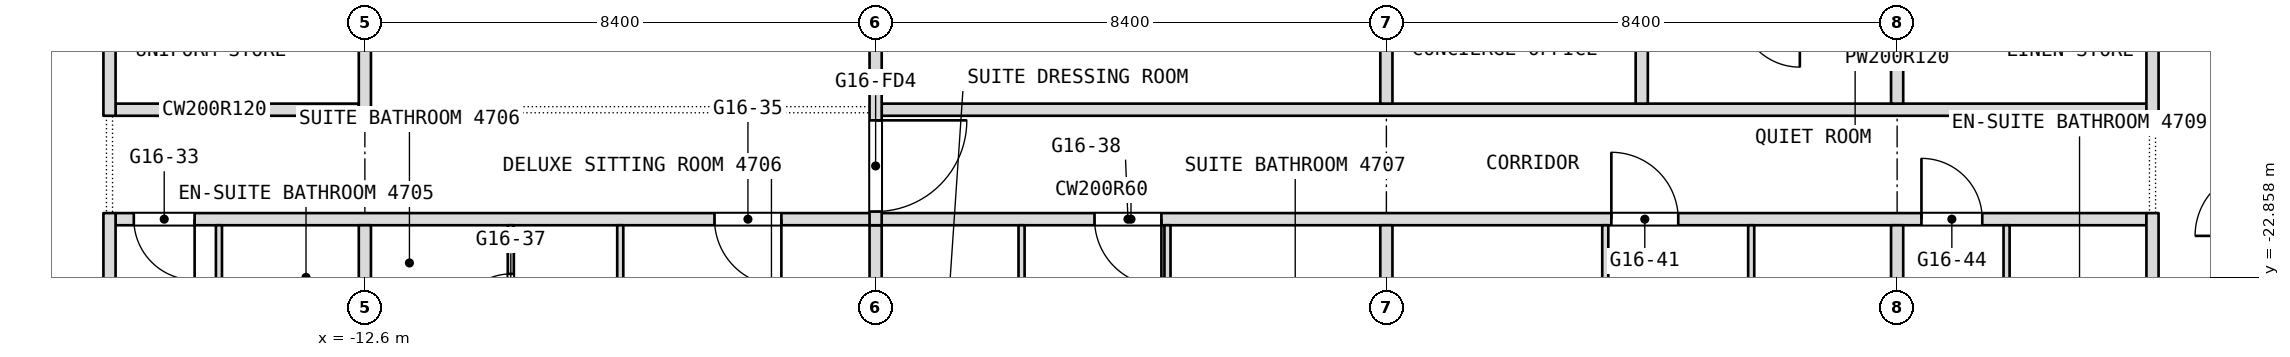
"""IFC4 building model, lengths in metres.
Left out: names, types, materials, properties, quantities, classifications, styles, units other than length and angle.
Written with IfcOpenShell. Run it as: python <this file> out.ifc"""

import sys

from ifc_helpers import new_model, si_unit, direction, frame, frame_2d, origin, place, context, subcontext, project, spatial, rectangle, extrude, element, fill, save


model = new_model("IFC4")
c1 = context("Model", 3, precision=1e-05, world=origin(), true_north=direction((0.0, 1.0)))
c2 = subcontext(c1, "Body", "Model", "MODEL_VIEW")
j1 = project(units=[si_unit("LENGTHUNIT", "METRE"), si_unit("PLANEANGLEUNIT", "RADIAN")], contexts=[c1])
p1 = place(None, origin())
s1 = spatial("IfcSite", under=j1, at=p1, CompositionType="ELEMENT")
p2 = place(p1, origin())
s2 = spatial("IfcBuilding", under=s1, at=p2, CompositionType="ELEMENT")
p3 = place(p2, frame((0.0, 0.0, 205.7)))
s3 = spatial("IfcBuildingStorey", under=s2, at=p3, CompositionType="ELEMENT", Elevation=205.7)
p4 = place(p3, frame((-16.7, -21.9, 0.0), z_axis=(0.0, 0.0, 1.0), x_axis=(1.0, 0.0, 0.0)))
e1 = element("IfcWall", 1, at=p4, inside=s3, PredefinedType="PARTITIONING", context=c2, shape_type="SweptSolid", body=[
    extrude(rectangle(XDim=33.4, YDim=0.2, at=frame_2d((16.7, 0.0))), origin(), (0.0, 0.0, 1.0), 3.34),
])
p5 = place(p4, frame((0.3, 0.0, 0.0)))
e2 = element("IfcOpeningElement", 2, at=p5, cuts=e1, PredefinedType="OPENING", context=c2, shape_type="SweptSolid", body=[
    extrude(rectangle(XDim=1.0, YDim=2.1, at=frame_2d((0.5, 1.05))), frame((0.0, 0.1, 0.0), z_axis=(0.0, -1.0, 0.0), x_axis=(1.0, 0.0, 0.0)), (0.0, 0.0, 1.0), 0.2),
])
p6 = place(p4, frame((9.85, 0.0, 0.0)))
e3 = element("IfcOpeningElement", 3, at=p6, cuts=e1, PredefinedType="OPENING", context=c2, shape_type="SweptSolid", body=[
    extrude(rectangle(XDim=1.1, YDim=2.1, at=frame_2d((0.55, 1.05))), frame((0.0, 0.1, 0.0), z_axis=(0.0, -1.0, 0.0), x_axis=(1.0, 0.0, 0.0)), (0.0, 0.0, 1.0), 0.2),
])
p7 = place(p4, frame((16.1, 0.0, 0.0)))
e4 = element("IfcOpeningElement", 4, at=p7, cuts=e1, PredefinedType="OPENING", context=c2, shape_type="SweptSolid", body=[
    extrude(rectangle(XDim=1.1, YDim=2.1, at=frame_2d((0.55, 1.05))), frame((0.0, 0.1, 0.0), z_axis=(0.0, -1.0, 0.0), x_axis=(1.0, 0.0, 0.0)), (0.0, 0.0, 1.0), 0.2),
])
p8 = place(p4, frame((24.6, 0.0, 0.0)))
e5 = element("IfcOpeningElement", 5, at=p8, cuts=e1, PredefinedType="OPENING", context=c2, shape_type="SweptSolid", body=[
    extrude(rectangle(XDim=1.1, YDim=2.1, at=frame_2d((0.55, 1.05))), frame((0.0, 0.1, 0.0), z_axis=(0.0, -1.0, 0.0), x_axis=(1.0, 0.0, 0.0)), (0.0, 0.0, 1.0), 0.2),
])
p9 = place(p4, frame((29.7, 0.0, 0.0)))
e6 = element("IfcOpeningElement", 6, at=p9, cuts=e1, PredefinedType="OPENING", context=c2, shape_type="SweptSolid", body=[
    extrude(rectangle(XDim=1.0, YDim=2.1, at=frame_2d((0.5, 1.05))), frame((0.0, 0.1, 0.0), z_axis=(0.0, -1.0, 0.0), x_axis=(1.0, 0.0, 0.0)), (0.0, 0.0, 1.0), 0.2),
])
p10 = place(p3, frame((-16.7, -20.1, 0.0), z_axis=(0.0, 0.0, 1.0), x_axis=(1.0, 0.0, 0.0)))
e7 = element("IfcWall", 7, at=p10, inside=s3, PredefinedType="PARTITIONING", context=c2, shape_type="SweptSolid", body=[
    extrude(rectangle(XDim=4.0, YDim=0.2, at=frame_2d((2.0, 0.0))), origin(), (0.0, 0.0, 1.0), 3.34),
])
p11 = place(p3, frame((-4.1, -20.1, 0.0), z_axis=(0.0, 0.0, 1.0), x_axis=(1.0, 0.0, 0.0)))
e8 = element("IfcWall", 8, at=p11, inside=s3, PredefinedType="PARTITIONING", context=c2, shape_type="SweptSolid", body=[
    extrude(rectangle(XDim=20.8, YDim=0.2, at=frame_2d((10.4, 0.0))), origin(), (0.0, 0.0, 1.0), 3.34),
])
p12 = place(p3, frame((16.8, -27.229, 0.0), z_axis=(0.0, 0.0, 1.0), x_axis=(0.0, 1.0, 0.0)))
e9 = element("IfcWall", 9, at=p12, inside=s3, PredefinedType="PARTITIONING", context=c2, shape_type="SweptSolid", body=[
    extrude(rectangle(XDim=5.429, YDim=0.2, at=frame_2d((2.714, 0.0))), origin(), (0.0, 0.0, 1.0), 3.34),
])
p13 = place(p3, frame((16.8, -20.2, 0.0), z_axis=(0.0, 0.0, 1.0), x_axis=(0.0, 1.0, 0.0)))
e10 = element("IfcWall", 10, at=p13, inside=s3, PredefinedType="PARTITIONING", context=c2, shape_type="SweptSolid", body=[
    extrude(rectangle(XDim=6.8, YDim=0.2, at=frame_2d((3.4, 0.0))), origin(), (0.0, 0.0, 1.0), 3.34),
])
p14 = place(p3, frame((14.4, -25.85, 0.0), z_axis=(0.0, 0.0, 1.0), x_axis=(0.0, 1.0, 0.0)))
e11 = element("IfcWall", 11, at=p14, inside=s3, PredefinedType="PARTITIONING", context=c2, shape_type="SweptSolid", body=[
    extrude(rectangle(XDim=3.85, YDim=0.1, at=frame_2d((1.925, 0.0))), origin(), (0.0, 0.0, 1.0), 3.34),
])
p15 = place(p3, frame((12.6, -28.343, 0.0), z_axis=(0.0, 0.0, 1.0), x_axis=(0.0, 1.0, 0.0)))
e12 = element("IfcWall", 12, at=p15, inside=s3, PredefinedType="PARTITIONING", context=c2, shape_type="SweptSolid", body=[
    extrude(rectangle(XDim=6.343, YDim=0.2, at=frame_2d((3.171, 0.0))), origin(), (0.0, 0.0, 1.0), 3.34),
])
p16 = place(p3, frame((12.6, -20.0, 0.0), z_axis=(0.0, 0.0, 1.0), x_axis=(0.0, 1.0, 0.0)))
e13 = element("IfcWall", 13, at=p16, inside=s3, PredefinedType="PARTITIONING", context=c2, shape_type="SweptSolid", body=[
    extrude(rectangle(XDim=1.5, YDim=0.2, at=frame_2d((0.75, 0.0))), origin(), (0.0, 0.0, 1.0), 3.34),
])
p17 = place(p3, frame((10.2, -25.55, 0.0), z_axis=(0.0, 0.0, 1.0), x_axis=(0.0, 1.0, 0.0)))
e14 = element("IfcWall", 14, at=p17, inside=s3, PredefinedType="PARTITIONING", context=c2, shape_type="SweptSolid", body=[
    extrude(rectangle(XDim=3.55, YDim=0.1, at=frame_2d((1.775, 0.0))), origin(), (0.0, 0.0, 1.0), 3.34),
])
p18 = place(p3, frame((8.4, -20.0, 0.0), z_axis=(0.0, 0.0, 1.0), x_axis=(0.0, 1.0, 0.0)))
e15 = element("IfcWall", 15, at=p18, inside=s3, PredefinedType="PARTITIONING", context=c2, shape_type="SweptSolid", body=[
    extrude(rectangle(XDim=1.5, YDim=0.2, at=frame_2d((0.75, 0.0))), origin(), (0.0, 0.0, 1.0), 3.34),
])
p19 = place(p3, frame((7.8, -25.45, 0.0), z_axis=(0.0, 0.0, 1.0), x_axis=(0.0, 1.0, 0.0)))
e16 = element("IfcWall", 16, at=p19, inside=s3, PredefinedType="PARTITIONING", context=c2, shape_type="SweptSolid", body=[
    extrude(rectangle(XDim=3.45, YDim=0.1, at=frame_2d((1.725, 0.0))), origin(), (0.0, 0.0, 1.0), 3.34),
])
p20 = place(p3, frame((4.2, -28.9, 0.0), z_axis=(0.0, 0.0, 1.0), x_axis=(0.0, 1.0, 0.0)))
e17 = element("IfcWall", 17, at=p20, inside=s3, PredefinedType="PARTITIONING", context=c2, shape_type="SweptSolid", body=[
    extrude(rectangle(XDim=6.9, YDim=0.2, at=frame_2d((3.45, 0.0))), origin(), (0.0, 0.0, 1.0), 3.34),
])
p21 = place(p3, frame((4.2, -20.0, 0.0), z_axis=(0.0, 0.0, 1.0), x_axis=(0.0, 1.0, 0.0)))
e18 = element("IfcWall", 18, at=p21, inside=s3, PredefinedType="PARTITIONING", context=c2, shape_type="SweptSolid", body=[
    extrude(rectangle(XDim=6.4, YDim=0.2, at=frame_2d((3.2, 0.0))), origin(), (0.0, 0.0, 1.0), 3.34),
])
p22 = place(p3, frame((0.6, -25.55, 0.0), z_axis=(0.0, 0.0, 1.0), x_axis=(0.0, 1.0, 0.0)))
e19 = element("IfcWall", 19, at=p22, inside=s3, PredefinedType="PARTITIONING", context=c2, shape_type="SweptSolid", body=[
    extrude(rectangle(XDim=3.55, YDim=0.1, at=frame_2d((1.775, 0.0))), origin(), (0.0, 0.0, 1.0), 3.34),
])
p23 = place(p3, frame((-1.8, -25.45, 0.0), z_axis=(0.0, 0.0, 1.0), x_axis=(0.0, 1.0, 0.0)))
e20 = element("IfcWall", 20, at=p23, inside=s3, PredefinedType="PARTITIONING", context=c2, shape_type="SweptSolid", body=[
    extrude(rectangle(XDim=3.45, YDim=0.1, at=frame_2d((1.725, 0.0))), origin(), (0.0, 0.0, 1.0), 3.34),
])
p24 = place(p3, frame((-4.2, -28.9, 0.0), z_axis=(0.0, 0.0, 1.0), x_axis=(0.0, 1.0, 0.0)))
e21 = element("IfcWall", 21, at=p24, inside=s3, PredefinedType="PARTITIONING", context=c2, shape_type="SweptSolid", body=[
    extrude(rectangle(XDim=6.9, YDim=0.2, at=frame_2d((3.45, 0.0))), origin(), (0.0, 0.0, 1.0), 3.34),
])
p25 = place(p3, frame((-4.2, -22.0, 0.0), z_axis=(0.0, 0.0, 1.0), x_axis=(0.0, 1.0, 0.0)))
e22 = element("IfcWall", 22, at=p25, inside=s3, PredefinedType="PARTITIONING", context=c2, shape_type="SweptSolid", body=[
    extrude(rectangle(XDim=8.4, YDim=0.2, at=frame_2d((4.2, 0.0))), origin(), (0.0, 0.0, 1.0), 3.34),
])
p26 = place(p25, frame((0.225, 0.0, 0.0)))
e23 = element("IfcOpeningElement", 23, at=p26, cuts=e22, PredefinedType="OPENING", context=c2, shape_type="SweptSolid", body=[
    extrude(rectangle(XDim=1.5, YDim=2.1, at=frame_2d((0.75, 1.05))), frame((0.0, 0.1, 0.0), z_axis=(0.0, -1.0, 0.0), x_axis=(1.0, 0.0, 0.0)), (0.0, 0.0, 1.0), 0.2),
])
p27 = place(p3, frame((-8.4, -28.9, 0.0), z_axis=(0.0, 0.0, 1.0), x_axis=(0.0, 1.0, 0.0)))
e24 = element("IfcWall", 24, at=p27, inside=s3, PredefinedType="PARTITIONING", context=c2, shape_type="SweptSolid", body=[
    extrude(rectangle(XDim=6.9, YDim=0.1, at=frame_2d((3.45, 0.0))), origin(), (0.0, 0.0, 1.0), 3.34),
])
p28 = place(p27, frame((2.53, 0.0, 0.0)))
e25 = element("IfcOpeningElement", 25, at=p28, cuts=e24, PredefinedType="OPENING", context=c2, shape_type="SweptSolid", body=[
    extrude(rectangle(XDim=0.9, YDim=2.1, at=frame_2d((0.45, 1.05))), frame((0.0, 0.05, 0.0), z_axis=(0.0, -1.0, 0.0), x_axis=(1.0, 0.0, 0.0)), (0.0, 0.0, 1.0), 0.1),
])
p29 = place(p3, frame((-10.2, -24.55, 0.0), z_axis=(0.0, 0.0, 1.0), x_axis=(0.0, 1.0, 0.0)))
e26 = element("IfcWall", 26, at=p29, inside=s3, PredefinedType="PARTITIONING", context=c2, shape_type="SweptSolid", body=[
    extrude(rectangle(XDim=2.55, YDim=0.1, at=frame_2d((1.275, 0.0))), origin(), (0.0, 0.0, 1.0), 3.34),
])
p30 = place(p29, frame((0.85, 0.0, 0.0)))
e27 = element("IfcOpeningElement", 27, at=p30, cuts=e26, PredefinedType="OPENING", context=c2, shape_type="SweptSolid", body=[
    extrude(rectangle(XDim=0.9, YDim=2.1, at=frame_2d((0.45, 1.05))), frame((0.0, 0.05, 0.0), z_axis=(0.0, -1.0, 0.0), x_axis=(1.0, 0.0, 0.0)), (0.0, 0.0, 1.0), 0.1),
])
p31 = place(p3, frame((-12.6, -28.343, 0.0), z_axis=(0.0, 0.0, 1.0), x_axis=(0.0, 1.0, 0.0)))
e28 = element("IfcWall", 28, at=p31, inside=s3, PredefinedType="PARTITIONING", context=c2, shape_type="SweptSolid", body=[
    extrude(rectangle(XDim=6.343, YDim=0.2, at=frame_2d((3.171, 0.0))), origin(), (0.0, 0.0, 1.0), 3.34),
])
p32 = place(p3, frame((-12.6, -20.2, 0.0), z_axis=(0.0, 0.0, 1.0), x_axis=(0.0, 1.0, 0.0)))
e29 = element("IfcWall", 29, at=p32, inside=s3, PredefinedType="PARTITIONING", context=c2, shape_type="SweptSolid", body=[
    extrude(rectangle(XDim=6.8, YDim=0.2, at=frame_2d((3.4, 0.0))), origin(), (0.0, 0.0, 1.0), 3.34),
])
p33 = place(p3, frame((-15.0, -24.75, 0.0), z_axis=(0.0, 0.0, 1.0), x_axis=(0.0, 1.0, 0.0)))
e30 = element("IfcWall", 30, at=p33, inside=s3, PredefinedType="PARTITIONING", context=c2, shape_type="SweptSolid", body=[
    extrude(rectangle(XDim=2.75, YDim=0.1, at=frame_2d((1.375, 0.0))), origin(), (0.0, 0.0, 1.0), 3.34),
])
p34 = place(p3, frame((-16.8, -27.229, 0.0), z_axis=(0.0, 0.0, 1.0), x_axis=(0.0, 1.0, 0.0)))
e31 = element("IfcWall", 31, at=p34, inside=s3, PredefinedType="PARTITIONING", context=c2, shape_type="SweptSolid", body=[
    extrude(rectangle(XDim=5.429, YDim=0.2, at=frame_2d((2.714, 0.0))), origin(), (0.0, 0.0, 1.0), 3.34),
])
p35 = place(p3, frame((-16.8, -20.2, 0.0), z_axis=(0.0, 0.0, 1.0), x_axis=(0.0, 1.0, 0.0)))
e32 = element("IfcWall", 32, at=p35, inside=s3, PredefinedType="PARTITIONING", context=c2, shape_type="SweptSolid", body=[
    extrude(rectangle(XDim=6.8, YDim=0.2, at=frame_2d((3.4, 0.0))), origin(), (0.0, 0.0, 1.0), 3.34),
])
p36 = place(p5, origin())
e33 = element("IfcDoor", 33, at=p36, inside=s3, OperationType="SINGLE_SWING_RIGHT", PredefinedType="DOOR", context=c2, shape_type="SweptSolid", body=[
    extrude(rectangle(XDim=1.0, YDim=2.1, at=frame_2d((0.5, 1.05))), frame((0.0, 0.025, 0.0), z_axis=(0.0, -1.0, 0.0), x_axis=(1.0, 0.0, 0.0)), (0.0, 0.0, 1.0), 0.05),
])
fill(e2, e33)
p37 = place(p6, origin())
e34 = element("IfcDoor", 34, at=p37, inside=s3, OperationType="SINGLE_SWING_LEFT", PredefinedType="DOOR", context=c2, shape_type="SweptSolid", body=[
    extrude(rectangle(XDim=1.1, YDim=2.1, at=frame_2d((0.55, 1.05))), frame((0.0, 0.025, 0.0), z_axis=(0.0, -1.0, 0.0), x_axis=(1.0, 0.0, 0.0)), (0.0, 0.0, 1.0), 0.05),
])
fill(e3, e34)
p38 = place(p7, origin())
e35 = element("IfcDoor", 35, at=p38, inside=s3, OperationType="SINGLE_SWING_LEFT", PredefinedType="DOOR", context=c2, shape_type="SweptSolid", body=[
    extrude(rectangle(XDim=1.1, YDim=2.1, at=frame_2d((0.55, 1.05))), frame((0.0, 0.025, 0.0), z_axis=(0.0, -1.0, 0.0), x_axis=(1.0, 0.0, 0.0)), (0.0, 0.0, 1.0), 0.05),
])
fill(e4, e35)
p39 = place(p8, origin())
e36 = element("IfcDoor", 36, at=p39, inside=s3, OperationType="SINGLE_SWING_RIGHT", PredefinedType="DOOR", context=c2, shape_type="SweptSolid", body=[
    extrude(rectangle(XDim=1.1, YDim=2.1, at=frame_2d((0.55, 1.05))), frame((0.0, 0.025, 0.0), z_axis=(0.0, -1.0, 0.0), x_axis=(1.0, 0.0, 0.0)), (0.0, 0.0, 1.0), 0.05),
])
fill(e5, e36)
p40 = place(p9, origin())
e37 = element("IfcDoor", 37, at=p40, inside=s3, OperationType="SINGLE_SWING_RIGHT", PredefinedType="DOOR", context=c2, shape_type="SweptSolid", body=[
    extrude(rectangle(XDim=1.0, YDim=2.1, at=frame_2d((0.5, 1.05))), frame((0.0, 0.025, 0.0), z_axis=(0.0, -1.0, 0.0), x_axis=(1.0, 0.0, 0.0)), (0.0, 0.0, 1.0), 0.05),
])
fill(e6, e37)
p41 = place(p30, origin())
e38 = element("IfcDoor", 38, at=p41, inside=s3, OperationType="SINGLE_SWING_RIGHT", PredefinedType="DOOR", context=c2, shape_type="SweptSolid", body=[
    extrude(rectangle(XDim=0.9, YDim=2.1, at=frame_2d((0.45, 1.05))), frame((0.0, 0.025, 0.0), z_axis=(0.0, -1.0, 0.0), x_axis=(1.0, 0.0, 0.0)), (0.0, 0.0, 1.0), 0.05),
])
fill(e27, e38)
p42 = place(p26, origin())
e39 = element("IfcDoor", 39, at=p42, inside=s3, OperationType="DOUBLE_DOOR_DOUBLE_SWING", PredefinedType="DOOR", context=c2, shape_type="SweptSolid", body=[
    extrude(rectangle(XDim=1.5, YDim=2.1, at=frame_2d((0.75, 1.05))), frame((0.0, 0.025, 0.0), z_axis=(0.0, -1.0, 0.0), x_axis=(1.0, 0.0, 0.0)), (0.0, 0.0, 1.0), 0.05),
])
fill(e23, e39)
save(model, sys.argv[1])
